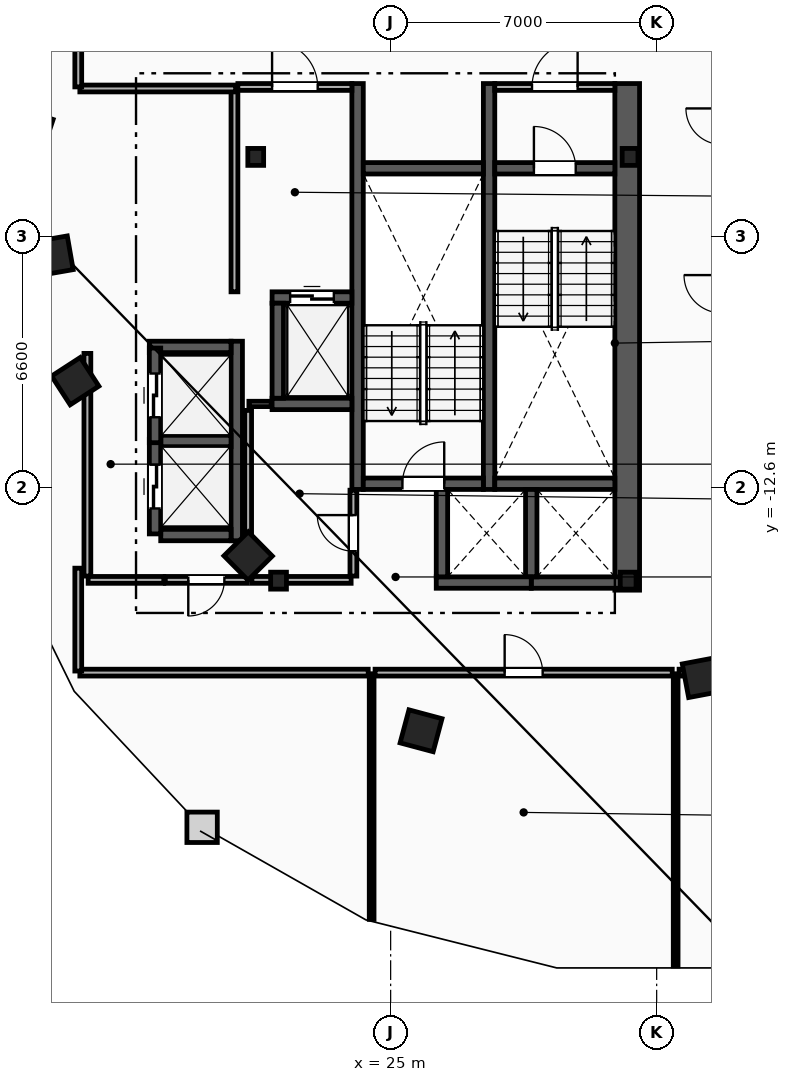
"""IFC4 building model, lengths in metres.
Left out: names, types, materials, properties, quantities, classifications, styles, units other than length and angle.
Written with IfcOpenShell. Run it as: python <this file> out.ifc"""

import sys

from ifc_helpers import new_model, si_unit, direction, frame, frame_2d, origin, origin_2d, place, context, subcontext, project, spatial, rectangle, i_section, extrude, element, fill, save


model = new_model("IFC4")
c1 = context("Model", 3, precision=1e-05, world=origin(), true_north=direction((0.0, 1.0)))
c2 = subcontext(c1, "Body", "Model", "MODEL_VIEW")
j1 = project(units=[si_unit("LENGTHUNIT", "METRE"), si_unit("PLANEANGLEUNIT", "RADIAN")], contexts=[c1])
p1 = place(None, origin())
s1 = spatial("IfcSite", under=j1, at=p1, CompositionType="ELEMENT")
p2 = place(p1, origin())
s2 = spatial("IfcBuilding", under=s1, at=p2, CompositionType="ELEMENT")
p3 = place(p2, frame((0.0, 0.0, 224.2)))
s3 = spatial("IfcBuildingStorey", under=s2, at=p3, CompositionType="ELEMENT", Elevation=224.2)
for number, where, z_axis, x_axis in (
    (1, (31.3, -3.9, 0.0), (0.0, 0.0, 1.0), (1.0, 0.0, 0.0)),
    (2, (21.45, -3.9, 0.0), (0.0, 0.0, 1.0), (1.0, 0.0, 0.0)),
    (3, (22.05, -15.05, 0.0), (0.0, 0.0, 1.0), (1.0, 0.0, 0.0)),
    (4, (31.25, -15.05, 0.0), (0.0, 0.0, 1.0), (1.0, 0.0, 0.0)),
):
    element("IfcColumn", number, at=place(p3, frame(where, z_axis=z_axis, x_axis=x_axis)), inside=s3, PredefinedType="COLUMN", context=c2, shape_type="SweptSolid", body=[
        extrude(i_section(OverallWidth=0.416, OverallDepth=0.446, WebThickness=0.039, FlangeThickness=0.063, FilletRadius=0.018, at=origin_2d()), origin(), (0.0, 0.0, 1.0), 3.6),
    ])
for number, where, z_axis, x_axis in (
    (5, (15.55, -3.2, 0.0), (0.0, 0.0, 1.0), (-0.315, -0.949, 0.0)),
    (6, (16.125, -6.5, 0.0), (0.0, 0.0, 1.0), (0.172, -0.985, 0.0)),
    (7, (16.7, -9.8, 0.0), (0.0, 0.0, 1.0), (0.544, -0.839, 0.0)),
    (8, (21.25, -14.4, 0.0), (0.0, 0.0, 1.0), (0.703, -0.711, 0.0)),
    (9, (25.8, -19.0, 0.0), (0.0, 0.0, 1.0), (0.966, -0.259, 0.0)),
    (10, (33.2, -17.6, 0.0), (0.0, 0.0, 1.0), (0.983, 0.186, 0.0)),
):
    element("IfcColumn", number, at=place(p3, frame(where, z_axis=z_axis, x_axis=x_axis)), inside=s3, PredefinedType="COLUMN", context=c2, shape_type="SweptSolid", body=[
        extrude(rectangle(XDim=0.9, YDim=0.9, at=origin_2d()), origin(), (0.0, 0.0, 1.0), 3.6),
    ])
p4 = place(p3, frame((31.225, -15.3, 0.0), z_axis=(0.0, 0.0, 1.0), x_axis=(0.0, 1.0, 0.0)))
e11 = element("IfcWall", 11, at=p4, inside=s3, PredefinedType="SHEAR", context=c2, shape_type="SweptSolid", body=[
    extrude(rectangle(XDim=13.33, YDim=0.65, at=frame_2d((6.665, 0.0))), origin(), (0.0, 0.0, 1.0), 3.34),
])
for number, where, z_axis, x_axis in (
    (12, (27.59, -12.65, 0.0), (0.0, 0.0, 1.0), (0.0, 1.0, 0.0)),
    (13, (24.13, -12.65, 0.0), (0.0, 0.0, 1.0), (0.0, 1.0, 0.0)),
):
    element("IfcWall", number, at=place(p3, frame(where, z_axis=z_axis, x_axis=x_axis)), inside=s3, PredefinedType="SHEAR", context=c2, shape_type="SweptSolid", body=[
        extrude(rectangle(XDim=10.68, YDim=0.3, at=frame_2d((5.34, 0.0))), origin(), (0.0, 0.0, 1.0), 3.34),
    ])
p5 = place(p3, frame((27.74, -4.2, 0.0), z_axis=(0.0, 0.0, 1.0), x_axis=(1.0, 0.0, 0.0)))
e14 = element("IfcWall", 14, at=p5, inside=s3, PredefinedType="SHEAR", context=c2, shape_type="SweptSolid", body=[
    extrude(rectangle(XDim=3.16, YDim=0.3, at=frame_2d((1.58, 0.0))), origin(), (0.0, 0.0, 1.0), 3.34),
])
p6 = place(p5, frame((1.03, 0.0, 0.0)))
e15 = element("IfcOpeningElement", 15, at=p6, cuts=e14, PredefinedType="OPENING", context=c2, shape_type="SweptSolid", body=[
    extrude(rectangle(XDim=1.1, YDim=2.15, at=frame_2d((0.55, 1.075))), frame((0.0, 0.16, 0.0), z_axis=(0.0, -1.0, 0.0), x_axis=(1.0, 0.0, 0.0)), (0.0, 0.0, 1.0), 0.32),
])
p7 = place(p3, frame((27.74, -12.5, 0.0), z_axis=(0.0, 0.0, 1.0), x_axis=(1.0, 0.0, 0.0)))
e16 = element("IfcWall", 16, at=p7, inside=s3, PredefinedType="SHEAR", context=c2, shape_type="SweptSolid", body=[
    extrude(rectangle(XDim=3.16, YDim=0.3, at=frame_2d((1.58, 0.0))), origin(), (0.0, 0.0, 1.0), 3.34),
])
p8 = place(p3, frame((24.28, -12.5, 0.0), z_axis=(0.0, 0.0, 1.0), x_axis=(1.0, 0.0, 0.0)))
e17 = element("IfcWall", 17, at=p8, inside=s3, PredefinedType="SHEAR", context=c2, shape_type="SweptSolid", body=[
    extrude(rectangle(XDim=3.16, YDim=0.3, at=frame_2d((1.58, 0.0))), origin(), (0.0, 0.0, 1.0), 3.34),
])
p9 = place(p8, frame((1.03, 0.0, 0.0)))
e18 = element("IfcOpeningElement", 18, at=p9, cuts=e17, PredefinedType="OPENING", context=c2, shape_type="SweptSolid", body=[
    extrude(rectangle(XDim=1.1, YDim=2.15, at=frame_2d((0.55, 1.075))), frame((0.0, 0.16, 0.0), z_axis=(0.0, -1.0, 0.0), x_axis=(1.0, 0.0, 0.0)), (0.0, 0.0, 1.0), 0.32),
])
p10 = place(p3, frame((24.28, -4.2, 0.0), z_axis=(0.0, 0.0, 1.0), x_axis=(1.0, 0.0, 0.0)))
e19 = element("IfcWall", 19, at=p10, inside=s3, PredefinedType="SHEAR", context=c2, shape_type="SweptSolid", body=[
    extrude(rectangle(XDim=3.16, YDim=0.3, at=frame_2d((1.58, 0.0))), origin(), (0.0, 0.0, 1.0), 3.34),
])
p11 = place(p3, frame((20.89, -7.45, 0.0), z_axis=(0.0, 0.0, 1.0), x_axis=(0.0, 1.0, 0.0)))
e20 = element("IfcWall", 20, at=p11, inside=s3, PredefinedType="PARTITIONING", context=c2, shape_type="SweptSolid", body=[
    extrude(rectangle(XDim=5.3, YDim=0.18, at=frame_2d((2.65, 0.0))), origin(), (0.0, 0.0, 1.0), 3.34),
])
p12 = place(p3, frame((20.98, -2.06, 0.0), z_axis=(0.0, 0.0, 1.0), x_axis=(1.0, 0.0, 0.0)))
e21 = element("IfcWall", 21, at=p12, inside=s3, PredefinedType="PARTITIONING", context=c2, shape_type="SweptSolid", body=[
    extrude(rectangle(XDim=3.0, YDim=0.18, at=frame_2d((1.5, 0.0))), origin(), (0.0, 0.0, 1.0), 3.34),
])
p13 = place(p12, frame((0.9, 0.0, 0.0)))
e22 = element("IfcOpeningElement", 22, at=p13, cuts=e21, PredefinedType="OPENING", context=c2, shape_type="SweptSolid", body=[
    extrude(rectangle(XDim=1.2, YDim=2.15, at=frame_2d((0.6, 1.075))), frame((0.0, 0.1, 0.0), z_axis=(0.0, -1.0, 0.0), x_axis=(1.0, 0.0, 0.0)), (0.0, 0.0, 1.0), 0.2),
])
p14 = place(p3, frame((27.74, -2.06, 0.0), z_axis=(0.0, 0.0, 1.0), x_axis=(1.0, 0.0, 0.0)))
e23 = element("IfcWall", 23, at=p14, inside=s3, PredefinedType="PARTITIONING", context=c2, shape_type="SweptSolid", body=[
    extrude(rectangle(XDim=3.16, YDim=0.18, at=frame_2d((1.58, 0.0))), origin(), (0.0, 0.0, 1.0), 3.34),
])
p15 = place(p14, frame((0.98, 0.0, 0.0)))
e24 = element("IfcOpeningElement", 24, at=p15, cuts=e23, PredefinedType="OPENING", context=c2, shape_type="SweptSolid", body=[
    extrude(rectangle(XDim=1.2, YDim=2.15, at=frame_2d((0.6, 1.075))), frame((0.0, 0.1, 0.0), z_axis=(0.0, -1.0, 0.0), x_axis=(1.0, 0.0, 0.0)), (0.0, 0.0, 1.0), 0.2),
])
p16 = place(p3, frame((21.88, -7.6, 0.0), z_axis=(0.0, 0.0, 1.0), x_axis=(1.0, 0.0, 0.0)))
e25 = element("IfcWall", 25, at=p16, inside=s3, PredefinedType="SHEAR", context=c2, shape_type="SweptSolid", body=[
    extrude(rectangle(XDim=2.1, YDim=0.3, at=frame_2d((1.05, 0.0))), origin(), (0.0, 0.0, 1.0), 3.34),
])
p17 = place(p16, frame((0.475, 0.0, 0.0)))
e26 = element("IfcOpeningElement", 26, at=p17, cuts=e25, PredefinedType="OPENING", context=c2, shape_type="SweptSolid", body=[
    extrude(rectangle(XDim=1.15, YDim=2.2, at=frame_2d((0.575, 1.1))), frame((0.0, 0.16, 0.0), z_axis=(0.0, -1.0, 0.0), x_axis=(1.0, 0.0, 0.0)), (0.0, 0.0, 1.0), 0.32),
])
p18 = place(p3, frame((21.88, -10.4, 0.0), z_axis=(0.0, 0.0, 1.0), x_axis=(1.0, 0.0, 0.0)))
e27 = element("IfcWall", 27, at=p18, inside=s3, PredefinedType="SHEAR", context=c2, shape_type="SweptSolid", body=[
    extrude(rectangle(XDim=2.1, YDim=0.3, at=frame_2d((1.05, 0.0))), origin(), (0.0, 0.0, 1.0), 3.34),
])
for number, where, z_axis, x_axis in (
    (28, (22.03, -10.25, 0.0), (0.0, 0.0, 1.0), (0.0, 1.0, 0.0)),
    (29, (28.7, -15.1, 0.0), (0.0, 0.0, 1.0), (1.0, 0.0, 0.0)),
):
    element("IfcWall", number, at=place(p3, frame(where, z_axis=z_axis, x_axis=x_axis)), inside=s3, PredefinedType="SHEAR", context=c2, shape_type="SweptSolid", body=[
        extrude(rectangle(XDim=2.5, YDim=0.3, at=frame_2d((1.25, 0.0))), origin(), (0.0, 0.0, 1.0), 3.34),
    ])
p19 = place(p3, frame((28.7, -14.95, 0.0), z_axis=(0.0, 0.0, 1.0), x_axis=(0.0, 1.0, 0.0)))
e30 = element("IfcWall", 30, at=p19, inside=s3, PredefinedType="SHEAR", context=c2, shape_type="SweptSolid", body=[
    extrude(rectangle(XDim=2.3, YDim=0.3, at=frame_2d((1.15, 0.0))), origin(), (0.0, 0.0, 1.0), 3.34),
])
p20 = place(p3, frame((26.2, -15.1, 0.0), z_axis=(0.0, 0.0, 1.0), x_axis=(1.0, 0.0, 0.0)))
e31 = element("IfcWall", 31, at=p20, inside=s3, PredefinedType="SHEAR", context=c2, shape_type="SweptSolid", body=[
    extrude(rectangle(XDim=2.5, YDim=0.3, at=frame_2d((1.25, 0.0))), origin(), (0.0, 0.0, 1.0), 3.34),
])
p21 = place(p3, frame((26.35, -14.95, 0.0), z_axis=(0.0, 0.0, 1.0), x_axis=(0.0, 1.0, 0.0)))
e32 = element("IfcWall", 32, at=p21, inside=s3, PredefinedType="SHEAR", context=c2, shape_type="SweptSolid", body=[
    extrude(rectangle(XDim=2.3, YDim=0.3, at=frame_2d((1.15, 0.0))), origin(), (0.0, 0.0, 1.0), 3.34),
])
p22 = place(p3, frame((20.95, -14.0, 0.0), z_axis=(0.0, 0.0, 1.0), x_axis=(0.0, 1.0, 0.0)))
e33 = element("IfcWall", 33, at=p22, inside=s3, PredefinedType="SHEAR", context=c2, shape_type="SweptSolid", body=[
    extrude(rectangle(XDim=5.25, YDim=0.3, at=frame_2d((2.625, 0.0))), origin(), (0.0, 0.0, 1.0), 3.34),
])
p23 = place(p3, frame((18.95, -13.85, 0.0), z_axis=(0.0, 0.0, 1.0), x_axis=(1.0, 0.0, 0.0)))
e34 = element("IfcWall", 34, at=p23, inside=s3, PredefinedType="SHEAR", context=c2, shape_type="SweptSolid", body=[
    extrude(rectangle(XDim=1.85, YDim=0.3, at=frame_2d((0.925, 0.0))), origin(), (0.0, 0.0, 1.0), 3.34),
])
p24 = place(p3, frame((18.65, -8.9, 0.0), z_axis=(0.0, 0.0, 1.0), x_axis=(1.0, 0.0, 0.0)))
e35 = element("IfcWall", 35, at=p24, inside=s3, PredefinedType="SHEAR", context=c2, shape_type="SweptSolid", body=[
    extrude(rectangle(XDim=2.15, YDim=0.3, at=frame_2d((1.075, 0.0))), origin(), (0.0, 0.0, 1.0), 3.34),
])
p25 = place(p3, frame((18.95, -11.375, 0.0), z_axis=(0.0, 0.0, 1.0), x_axis=(1.0, 0.0, 0.0)))
e36 = element("IfcWall", 36, at=p25, inside=s3, PredefinedType="SHEAR", context=c2, shape_type="SweptSolid", body=[
    extrude(rectangle(XDim=1.85, YDim=0.3, at=frame_2d((0.925, 0.0))), origin(), (0.0, 0.0, 1.0), 3.34),
])
p26 = place(p3, frame((18.8, -13.82, 0.0), z_axis=(0.0, 0.0, 1.0), x_axis=(0.0, 1.0, 0.0)))
e37 = element("IfcWall", 37, at=p26, inside=s3, PredefinedType="SHEAR", context=c2, shape_type="SweptSolid", body=[
    extrude(rectangle(XDim=2.49, YDim=0.3, at=frame_2d((1.245, 0.0))), origin(), (0.0, 0.0, 1.0), 3.34),
])
p27 = place(p26, frame((0.67, 0.0, 0.0)))
e38 = element("IfcOpeningElement", 38, at=p27, cuts=e37, PredefinedType="OPENING", context=c2, shape_type="SweptSolid", body=[
    extrude(rectangle(XDim=1.15, YDim=2.2, at=frame_2d((0.575, 1.1))), frame((0.0, 0.16, 0.0), z_axis=(0.0, -1.0, 0.0), x_axis=(1.0, 0.0, 0.0)), (0.0, 0.0, 1.0), 0.32),
])
p28 = place(p3, frame((18.8, -11.42, 0.0), z_axis=(0.0, 0.0, 1.0), x_axis=(0.0, 1.0, 0.0)))
e39 = element("IfcWall", 39, at=p28, inside=s3, PredefinedType="SHEAR", context=c2, shape_type="SweptSolid", body=[
    extrude(rectangle(XDim=2.49, YDim=0.3, at=frame_2d((1.245, 0.0))), origin(), (0.0, 0.0, 1.0), 3.34),
])
p29 = place(p28, frame((0.67, 0.0, 0.0)))
e40 = element("IfcOpeningElement", 40, at=p29, cuts=e39, PredefinedType="OPENING", context=c2, shape_type="SweptSolid", body=[
    extrude(rectangle(XDim=1.15, YDim=2.2, at=frame_2d((0.575, 1.1))), frame((0.0, 0.16, 0.0), z_axis=(0.0, -1.0, 0.0), x_axis=(1.0, 0.0, 0.0)), (0.0, 0.0, 1.0), 0.32),
])
p30 = place(p3, frame((17.02, -14.93, 0.0), z_axis=(0.0, 0.0, 1.0), x_axis=(0.0, 1.0, 0.0)))
e41 = element("IfcWall", 41, at=p30, inside=s3, PredefinedType="PARTITIONING", context=c2, shape_type="SweptSolid", body=[
    extrude(rectangle(XDim=5.86, YDim=0.18, at=frame_2d((2.93, 0.0))), origin(), (0.0, 0.0, 1.0), 3.34),
])
p31 = place(p3, frame((17.04, -15.03, 0.0), z_axis=(0.0, 0.0, 1.0), x_axis=(1.0, 0.0, 0.0)))
e42 = element("IfcWall", 42, at=p31, inside=s3, PredefinedType="PARTITIONING", context=c2, shape_type="SweptSolid", body=[
    extrude(rectangle(XDim=1.99, YDim=0.18, at=frame_2d((0.995, 0.0))), origin(), (0.0, 0.0, 1.0), 3.34),
])
p32 = place(p3, frame((21.23, -15.03, 0.0), z_axis=(0.0, 0.0, 1.0), x_axis=(-1.0, 0.0, 0.0)))
e43 = element("IfcWall", 43, at=p32, inside=s3, PredefinedType="PARTITIONING", context=c2, shape_type="SweptSolid", body=[
    extrude(rectangle(XDim=2.16, YDim=0.18, at=frame_2d((1.08, 0.0))), origin(), (0.0, 0.0, 1.0), 3.34),
])
p33 = place(p32, frame((0.605, 0.0, 0.0)))
e44 = element("IfcOpeningElement", 44, at=p33, cuts=e43, PredefinedType="OPENING", context=c2, shape_type="SweptSolid", body=[
    extrude(rectangle(XDim=0.95, YDim=2.1, at=frame_2d((0.475, 1.05))), frame((0.0, 0.1, 0.0), z_axis=(0.0, -1.0, 0.0), x_axis=(1.0, 0.0, 0.0)), (0.0, 0.0, 1.0), 0.2),
])
p34 = place(p3, frame((21.27, -10.4, 0.0), z_axis=(0.0, 0.0, 1.0), x_axis=(1.0, 0.0, 0.0)))
e45 = element("IfcWall", 45, at=p34, inside=s3, PredefinedType="PARTITIONING", context=c2, shape_type="SweptSolid", body=[
    extrude(rectangle(XDim=0.59, YDim=0.14, at=frame_2d((0.295, 0.0))), origin(), (0.0, 0.0, 1.0), 3.34),
])
p35 = place(p3, frame((21.25, -14.93, 0.0), z_axis=(0.0, 0.0, 1.0), x_axis=(0.0, 1.0, 0.0)))
e46 = element("IfcWall", 46, at=p35, inside=s3, PredefinedType="PARTITIONING", context=c2, shape_type="SweptSolid", body=[
    extrude(rectangle(XDim=4.36, YDim=0.18, at=frame_2d((2.18, 0.0))), origin(), (0.0, 0.0, 1.0), 3.34),
])
p36 = place(p3, frame((21.35, -15.03, 0.0), z_axis=(0.0, 0.0, 1.0), x_axis=(1.0, 0.0, 0.0)))
e47 = element("IfcWall", 47, at=p36, inside=s3, PredefinedType="PARTITIONING", context=c2, shape_type="SweptSolid", body=[
    extrude(rectangle(XDim=2.61, YDim=0.18, at=frame_2d((1.305, 0.0))), origin(), (0.0, 0.0, 1.0), 2.413),
])
p37 = place(p3, frame((24.02, -14.93, 0.0), z_axis=(0.0, 0.0, 1.0), x_axis=(0.0, 1.0, 0.0)))
e48 = element("IfcWall", 48, at=p37, inside=s3, PredefinedType="PARTITIONING", context=c2, shape_type="SweptSolid", body=[
    extrude(rectangle(XDim=2.26, YDim=0.18, at=frame_2d((1.13, 0.0))), origin(), (0.0, 0.0, 1.0), 3.34),
])
p38 = place(p37, frame((0.655, 0.0, 0.0)))
e49 = element("IfcOpeningElement", 49, at=p38, cuts=e48, PredefinedType="OPENING", context=c2, shape_type="SweptSolid", body=[
    extrude(rectangle(XDim=0.95, YDim=2.1, at=frame_2d((0.475, 1.05))), frame((0.0, 0.1, 0.0), z_axis=(0.0, -1.0, 0.0), x_axis=(1.0, 0.0, 0.0)), (0.0, 0.0, 1.0), 0.2),
])
p39 = place(p3, frame((24.5, -23.963, 0.0), z_axis=(0.0, 0.0, 1.0), x_axis=(0.0, 1.0, 0.0)))
e50 = element("IfcWall", 50, at=p39, inside=s3, PredefinedType="PARTITIONING", context=c2, shape_type="SweptSolid", body=[
    extrude(rectangle(XDim=6.463, YDim=0.125, at=frame_2d((3.231, 0.0))), origin(), (0.0, 0.0, 1.0), 3.34),
])
p40 = place(p3, frame((32.5, -25.19, 0.0), z_axis=(0.0, 0.0, 1.0), x_axis=(0.0, 1.0, 0.0)))
e51 = element("IfcWall", 51, at=p40, inside=s3, PredefinedType="PARTITIONING", context=c2, shape_type="SweptSolid", body=[
    extrude(rectangle(XDim=7.69, YDim=0.125, at=frame_2d((3.845, 0.0))), origin(), (0.0, 0.0, 1.0), 3.34),
])
p41 = place(p3, frame((24.59, -17.47, 0.0), z_axis=(0.0, 0.0, 1.0), x_axis=(1.0, 0.0, 0.0)))
e52 = element("IfcWall", 52, at=p41, inside=s3, PredefinedType="PARTITIONING", context=c2, shape_type="SweptSolid", body=[
    extrude(rectangle(XDim=7.82, YDim=0.18, at=frame_2d((3.91, 0.0))), origin(), (0.0, 0.0, 1.0), 3.34),
])
p42 = place(p41, frame((3.41, 0.0, 0.0)))
e53 = element("IfcOpeningElement", 53, at=p42, cuts=e52, PredefinedType="OPENING", context=c2, shape_type="SweptSolid", body=[
    extrude(rectangle(XDim=1.0, YDim=2.15, at=frame_2d((0.5, 1.075))), frame((0.0, 0.1, 0.0), z_axis=(0.0, -1.0, 0.0), x_axis=(1.0, 0.0, 0.0)), (0.0, 0.0, 1.0), 0.2),
])
p43 = place(p3, frame((32.59, -17.47, 0.0), z_axis=(0.0, 0.0, 1.0), x_axis=(1.0, 0.0, 0.0)))
e54 = element("IfcWall", 54, at=p43, inside=s3, PredefinedType="PARTITIONING", context=c2, shape_type="SweptSolid", body=[
    extrude(rectangle(XDim=1.038, YDim=0.18, at=frame_2d((0.519, 0.0))), origin(), (0.0, 0.0, 1.0), 3.34),
])
p44 = place(p3, frame((16.822, -17.47, 0.0), z_axis=(0.0, 0.0, 1.0), x_axis=(1.0, 0.0, 0.0)))
e55 = element("IfcWall", 55, at=p44, inside=s3, PredefinedType="PARTITIONING", context=c2, shape_type="SweptSolid", body=[
    extrude(rectangle(XDim=7.588, YDim=0.18, at=frame_2d((3.794, 0.0))), origin(), (0.0, 0.0, 1.0), 3.34),
])
p45 = place(p3, frame((16.822, -2.1, 0.0), z_axis=(0.0, 0.0, 1.0), x_axis=(1.0, 0.0, 0.0)))
e56 = element("IfcWall", 56, at=p45, inside=s3, PredefinedType="PARTITIONING", context=c2, shape_type="SweptSolid", body=[
    extrude(rectangle(XDim=4.098, YDim=0.18, at=frame_2d((2.049, 0.0))), origin(), (0.0, 0.0, 1.0), 3.34),
])
p46 = place(p3, frame((16.78, -14.721, 0.0), z_axis=(0.0, 0.0, 1.0), x_axis=(0.0, -1.0, 0.0)))
e57 = element("IfcWall", 57, at=p46, inside=s3, PredefinedType="PARTITIONING", context=c2, shape_type="SweptSolid", body=[
    extrude(rectangle(XDim=2.707, YDim=0.18, at=frame_2d((1.354, 0.0))), origin(), (0.0, 0.0, 1.0), 3.34),
])
p47 = place(p3, frame((16.78, 0.329, 0.0), z_axis=(0.0, 0.0, 1.0), x_axis=(0.0, -1.0, 0.0)))
e58 = element("IfcWall", 58, at=p47, inside=s3, PredefinedType="PARTITIONING", context=c2, shape_type="SweptSolid", body=[
    extrude(rectangle(XDim=2.387, YDim=0.18, at=frame_2d((1.194, 0.0))), origin(), (0.0, 0.0, 1.0), 3.34),
])
p48 = place(p6, origin())
e59 = element("IfcDoor", 59, at=p48, inside=s3, OperationType="SINGLE_SWING_LEFT", PredefinedType="DOOR", context=c2, shape_type="SweptSolid", body=[
    extrude(rectangle(XDim=1.1, YDim=2.15, at=frame_2d((0.55, 1.075))), frame((0.0, 0.025, 0.0), z_axis=(0.0, -1.0, 0.0), x_axis=(1.0, 0.0, 0.0)), (0.0, 0.0, 1.0), 0.05),
])
fill(e15, e59)
p49 = place(p9, origin())
e60 = element("IfcDoor", 60, at=p49, inside=s3, OperationType="SINGLE_SWING_RIGHT", PredefinedType="DOOR", context=c2, shape_type="SweptSolid", body=[
    extrude(rectangle(XDim=1.1, YDim=2.15, at=frame_2d((0.55, 1.075))), frame((0.0, 0.025, 0.0), z_axis=(0.0, -1.0, 0.0), x_axis=(1.0, 0.0, 0.0)), (0.0, 0.0, 1.0), 0.05),
])
fill(e18, e60)
p50 = place(p13, origin())
e61 = element("IfcDoor", 61, at=p50, inside=s3, OperationType="SINGLE_SWING_LEFT", PredefinedType="DOOR", context=c2, shape_type="SweptSolid", body=[
    extrude(rectangle(XDim=1.2, YDim=2.15, at=frame_2d((0.6, 1.075))), frame((0.0, 0.025, 0.0), z_axis=(0.0, -1.0, 0.0), x_axis=(1.0, 0.0, 0.0)), (0.0, 0.0, 1.0), 0.05),
])
fill(e22, e61)
p51 = place(p15, origin())
e62 = element("IfcDoor", 62, at=p51, inside=s3, OperationType="SINGLE_SWING_RIGHT", PredefinedType="DOOR", context=c2, shape_type="SweptSolid", body=[
    extrude(rectangle(XDim=1.2, YDim=2.15, at=frame_2d((0.6, 1.075))), frame((0.0, 0.025, 0.0), z_axis=(0.0, -1.0, 0.0), x_axis=(1.0, 0.0, 0.0)), (0.0, 0.0, 1.0), 0.05),
])
fill(e24, e62)
p52 = place(p17, origin())
e63 = element("IfcDoor", 63, at=p52, inside=s3, OperationType="SLIDING_TO_LEFT", PredefinedType="TRAPDOOR", context=c2, shape_type="SweptSolid", body=[
    extrude(rectangle(XDim=1.15, YDim=2.2, at=frame_2d((0.575, 1.1))), frame((0.0, 0.025, 0.0), z_axis=(0.0, -1.0, 0.0), x_axis=(1.0, 0.0, 0.0)), (0.0, 0.0, 1.0), 0.05),
])
fill(e26, e63)
p53 = place(p27, origin())
e64 = element("IfcDoor", 64, at=p53, inside=s3, OperationType="SLIDING_TO_LEFT", PredefinedType="TRAPDOOR", context=c2, shape_type="SweptSolid", body=[
    extrude(rectangle(XDim=1.15, YDim=2.2, at=frame_2d((0.575, 1.1))), frame((0.0, 0.025, 0.0), z_axis=(0.0, -1.0, 0.0), x_axis=(1.0, 0.0, 0.0)), (0.0, 0.0, 1.0), 0.05),
])
fill(e38, e64)
p54 = place(p29, origin())
e65 = element("IfcDoor", 65, at=p54, inside=s3, OperationType="SLIDING_TO_LEFT", PredefinedType="TRAPDOOR", context=c2, shape_type="SweptSolid", body=[
    extrude(rectangle(XDim=1.15, YDim=2.2, at=frame_2d((0.575, 1.1))), frame((0.0, 0.025, 0.0), z_axis=(0.0, -1.0, 0.0), x_axis=(1.0, 0.0, 0.0)), (0.0, 0.0, 1.0), 0.05),
])
fill(e40, e65)
p55 = place(p42, origin())
e66 = element("IfcDoor", 66, at=p55, inside=s3, OperationType="SINGLE_SWING_LEFT", PredefinedType="DOOR", context=c2, shape_type="SweptSolid", body=[
    extrude(rectangle(XDim=1.0, YDim=2.15, at=frame_2d((0.5, 1.075))), frame((0.0, 0.025, 0.0), z_axis=(0.0, -1.0, 0.0), x_axis=(1.0, 0.0, 0.0)), (0.0, 0.0, 1.0), 0.05),
])
fill(e53, e66)
p56 = place(p38, origin())
e67 = element("IfcDoor", 67, at=p56, inside=s3, OperationType="SINGLE_SWING_RIGHT", PredefinedType="DOOR", context=c2, shape_type="SweptSolid", body=[
    extrude(rectangle(XDim=0.95, YDim=2.1, at=frame_2d((0.475, 1.05))), frame((0.0, 0.025, 0.0), z_axis=(0.0, -1.0, 0.0), x_axis=(1.0, 0.0, 0.0)), (0.0, 0.0, 1.0), 0.05),
])
fill(e49, e67)
p57 = place(p33, origin())
e68 = element("IfcDoor", 68, at=p57, inside=s3, OperationType="SINGLE_SWING_RIGHT", PredefinedType="DOOR", context=c2, shape_type="SweptSolid", body=[
    extrude(rectangle(XDim=0.95, YDim=2.1, at=frame_2d((0.475, 1.05))), frame((0.0, 0.025, 0.0), z_axis=(0.0, -1.0, 0.0), x_axis=(1.0, 0.0, 0.0)), (0.0, 0.0, 1.0), 0.05),
])
fill(e44, e68)
save(model, sys.argv[1])
